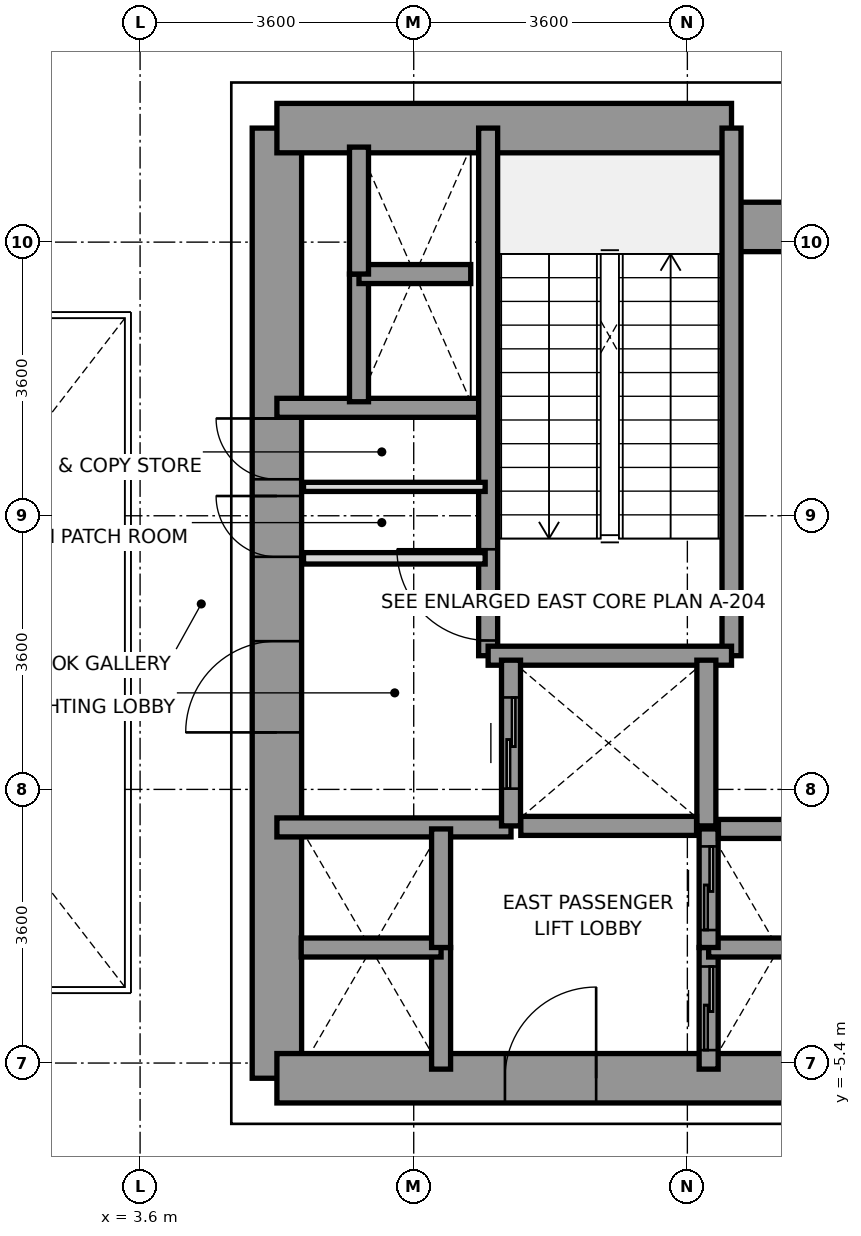
"""IFC4 building model, lengths in metres.
Left out: names, types, materials, properties, quantities, classifications, styles, units other than length and angle.
Written with IfcOpenShell. Run it as: python <this file> out.ifc"""

import sys

from ifc_helpers import new_model, si_unit, direction, frame, frame_2d, origin, place, context, subcontext, project, spatial, rectangle, extrude, source, transform, mapped, element, fill, save


model = new_model("IFC4")
c1 = context("Model", 3, precision=1e-05, world=origin(), true_north=direction((0.0, 1.0)))
c2 = subcontext(c1, "Body", "Model", "MODEL_VIEW")
j1 = project(units=[si_unit("LENGTHUNIT", "METRE"), si_unit("PLANEANGLEUNIT", "RADIAN")], contexts=[c1])
p1 = place(None, origin())
s1 = spatial("IfcSite", under=j1, at=p1, CompositionType="ELEMENT")
p2 = place(p1, origin())
s2 = spatial("IfcBuilding", under=s1, at=p2, CompositionType="ELEMENT")
p3 = place(p2, frame((0.0, 0.0, 20.4)))
s3 = spatial("IfcBuildingStorey", under=s2, at=p3, CompositionType="ELEMENT", Elevation=20.4)
p4 = place(p3, frame((5.4, -5.6, 0.0), z_axis=(0.0, 0.0, 1.0), x_axis=(0.0, 1.0, 0.0)))
e1 = element("IfcWall", 1, at=p4, inside=s3, PredefinedType="SHEAR", context=c2, shape_type="SweptSolid", body=[
    extrude(rectangle(XDim=12.5, YDim=0.65, at=frame_2d((6.25, 0.0))), origin(), (0.0, 0.0, 1.0), 4.48),
])
p5 = place(p4, frame((4.55, 0.0, 0.0)))
e2 = element("IfcOpeningElement", 2, at=p5, cuts=e1, PredefinedType="OPENING", context=c2, shape_type="SweptSolid", body=[
    extrude(rectangle(XDim=1.2, YDim=2.2, at=frame_2d((0.6, 1.1))), frame((0.0, 0.335, 0.0), z_axis=(0.0, -1.0, 0.0), x_axis=(1.0, 0.0, 0.0)), (0.0, 0.0, 1.0), 0.67),
])
p6 = place(p4, frame((6.86, 0.0, 0.0)))
e3 = element("IfcOpeningElement", 3, at=p6, cuts=e1, PredefinedType="OPENING", context=c2, shape_type="SweptSolid", body=[
    extrude(rectangle(XDim=0.8, YDim=2.1, at=frame_2d((0.4, 1.05))), frame((0.0, 0.335, 0.0), z_axis=(0.0, -1.0, 0.0), x_axis=(1.0, 0.0, 0.0)), (0.0, 0.0, 1.0), 0.67),
])
p7 = place(p4, frame((7.88, 0.0, 0.0)))
e4 = element("IfcOpeningElement", 4, at=p7, cuts=e1, PredefinedType="OPENING", context=c2, shape_type="SweptSolid", body=[
    extrude(rectangle(XDim=0.8, YDim=2.1, at=frame_2d((0.4, 1.05))), frame((0.0, 0.335, 0.0), z_axis=(0.0, -1.0, 0.0), x_axis=(1.0, 0.0, 0.0)), (0.0, 0.0, 1.0), 0.67),
])
p8 = place(p3, frame((5.4, 6.9, 0.0), z_axis=(0.0, 0.0, 1.0), x_axis=(1.0, 0.0, 0.0)))
e5 = element("IfcWall", 5, at=p8, inside=s3, PredefinedType="SHEAR", context=c2, shape_type="SweptSolid", body=[
    extrude(rectangle(XDim=5.981, YDim=0.65, at=frame_2d((2.991, 0.0))), origin(), (0.0, 0.0, 1.0), 4.48),
])
p9 = place(p3, frame((11.381, 5.6, 0.0), z_axis=(0.0, 0.0, 1.0), x_axis=(1.0, 0.0, 0.0)))
e6 = element("IfcWall", 6, at=p9, inside=s3, PredefinedType="SHEAR", context=c2, shape_type="SweptSolid", body=[
    extrude(rectangle(XDim=1.819, YDim=0.65, at=frame_2d((0.909, 0.0))), origin(), (0.0, 0.0, 1.0), 4.48),
])
p10 = place(p3, frame((5.4, -5.6, 0.0), z_axis=(0.0, 0.0, 1.0), x_axis=(1.0, 0.0, 0.0)))
e7 = element("IfcWall", 7, at=p10, inside=s3, PredefinedType="SHEAR", context=c2, shape_type="SweptSolid", body=[
    extrude(rectangle(XDim=7.8, YDim=0.65, at=frame_2d((3.9, 0.0))), origin(), (0.0, 0.0, 1.0), 4.48),
])
p11 = place(p10, frame((3.0, 0.0, 0.0)))
e8 = element("IfcOpeningElement", 8, at=p11, cuts=e7, PredefinedType="OPENING", context=c2, shape_type="SweptSolid", body=[
    extrude(rectangle(XDim=1.2, YDim=2.2, at=frame_2d((0.6, 1.1))), frame((0.0, 0.335, 0.0), z_axis=(0.0, -1.0, 0.0), x_axis=(1.0, 0.0, 0.0)), (0.0, 0.0, 1.0), 0.67),
])
p12 = place(p3, frame((5.4, 3.22, 0.0), z_axis=(0.0, 0.0, 1.0), x_axis=(1.0, 0.0, 0.0)))
e9 = element("IfcWall", 9, at=p12, inside=s3, PredefinedType="SOLIDWALL", context=c2, shape_type="SweptSolid", body=[
    extrude(rectangle(XDim=2.78, YDim=0.25, at=frame_2d((1.39, 0.0))), origin(), (0.0, 0.0, 1.0), 4.48),
])
p13 = place(p3, frame((5.4, -2.3, 0.0), z_axis=(0.0, 0.0, 1.0), x_axis=(1.0, 0.0, 0.0)))
e10 = element("IfcWall", 10, at=p13, inside=s3, PredefinedType="SOLIDWALL", context=c2, shape_type="SweptSolid", body=[
    extrude(rectangle(XDim=3.08, YDim=0.25, at=frame_2d((1.54, 0.0))), origin(), (0.0, 0.0, 1.0), 4.48),
])
p14 = place(p3, frame((8.179, -0.041, 0.0), z_axis=(0.0, 0.0, 1.0), x_axis=(0.0, 1.0, 0.0)))
e11 = element("IfcWall", 11, at=p14, inside=s3, PredefinedType="SOLIDWALL", context=c2, shape_type="SweptSolid", body=[
    extrude(rectangle(XDim=6.941, YDim=0.25, at=frame_2d((3.47, 0.0))), origin(), (0.0, 0.0, 1.0), 4.48),
])
p15 = place(p14, frame((0.2, 0.0, 0.0)))
e12 = element("IfcOpeningElement", 12, at=p15, cuts=e11, PredefinedType="OPENING", context=c2, shape_type="SweptSolid", body=[
    extrude(rectangle(XDim=1.2, YDim=2.2, at=frame_2d((0.6, 1.1))), frame((0.0, 0.135, 0.0), z_axis=(0.0, -1.0, 0.0), x_axis=(1.0, 0.0, 0.0)), (0.0, 0.0, 1.0), 0.27),
])
p16 = place(p3, frame((11.381, -0.041, 0.0), z_axis=(0.0, 0.0, 1.0), x_axis=(0.0, 1.0, 0.0)))
e13 = element("IfcWall", 13, at=p16, inside=s3, PredefinedType="SOLIDWALL", context=c2, shape_type="SweptSolid", body=[
    extrude(rectangle(XDim=6.941, YDim=0.25, at=frame_2d((3.47, 0.0))), origin(), (0.0, 0.0, 1.0), 4.48),
])
p17 = place(p3, frame((8.179, -0.041, 0.0), z_axis=(0.0, 0.0, 1.0), x_axis=(1.0, 0.0, 0.0)))
e14 = element("IfcWall", 14, at=p17, inside=s3, PredefinedType="SOLIDWALL", context=c2, shape_type="SweptSolid", body=[
    extrude(rectangle(XDim=3.202, YDim=0.25, at=frame_2d((1.601, 0.0))), origin(), (0.0, 0.0, 1.0), 4.48),
])
p18 = place(p3, frame((8.48, -2.28, 0.0), z_axis=(0.0, 0.0, 1.0), x_axis=(0.0, 1.0, 0.0)))
e15 = element("IfcWall", 15, at=p18, inside=s3, PredefinedType="SOLIDWALL", context=c2, shape_type="SweptSolid", body=[
    extrude(rectangle(XDim=2.18, YDim=0.25, at=frame_2d((1.09, 0.0))), origin(), (0.0, 0.0, 1.0), 4.48),
])
p19 = place(p18, frame((0.49, 0.0, 0.0)))
e16 = element("IfcOpeningElement", 16, at=p19, cuts=e15, PredefinedType="OPENING", context=c2, shape_type="SweptSolid", body=[
    extrude(rectangle(XDim=1.2, YDim=2.2, at=frame_2d((0.6, 1.1))), frame((0.0, 0.135, 0.0), z_axis=(0.0, -1.0, 0.0), x_axis=(1.0, 0.0, 0.0)), (0.0, 0.0, 1.0), 0.27),
])
p20 = place(p3, frame((11.05, -2.28, 0.0), z_axis=(0.0, 0.0, 1.0), x_axis=(0.0, 1.0, 0.0)))
e17 = element("IfcWall", 17, at=p20, inside=s3, PredefinedType="SOLIDWALL", context=c2, shape_type="SweptSolid", body=[
    extrude(rectangle(XDim=2.18, YDim=0.25, at=frame_2d((1.09, 0.0))), origin(), (0.0, 0.0, 1.0), 4.48),
])
p21 = place(p3, frame((8.609, -2.28, 0.0), z_axis=(0.0, 0.0, 1.0), x_axis=(1.0, 0.0, 0.0)))
e18 = element("IfcWall", 18, at=p21, inside=s3, PredefinedType="SOLIDWALL", context=c2, shape_type="SweptSolid", body=[
    extrude(rectangle(XDim=2.312, YDim=0.25, at=frame_2d((1.156, 0.0))), origin(), (0.0, 0.0, 1.0), 4.48),
])
p22 = place(p3, frame((11.08, -5.48, 0.0), z_axis=(0.0, 0.0, 1.0), x_axis=(0.0, 1.0, 0.0)))
e19 = element("IfcWall", 19, at=p22, inside=s3, PredefinedType="SOLIDWALL", context=c2, shape_type="SweptSolid", body=[
    extrude(rectangle(XDim=1.6, YDim=0.25, at=frame_2d((0.8, 0.0))), origin(), (0.0, 0.0, 1.0), 4.48),
])
p23 = place(p22, frame((0.25, 0.0, 0.0)))
e20 = element("IfcOpeningElement", 20, at=p23, cuts=e19, PredefinedType="OPENING", context=c2, shape_type="SweptSolid", body=[
    extrude(rectangle(XDim=1.1, YDim=2.2, at=frame_2d((0.55, 1.1))), frame((0.0, 0.135, 0.0), z_axis=(0.0, -1.0, 0.0), x_axis=(1.0, 0.0, 0.0)), (0.0, 0.0, 1.0), 0.27),
])
p24 = place(p3, frame((11.08, -3.88, 0.0), z_axis=(0.0, 0.0, 1.0), x_axis=(1.0, 0.0, 0.0)))
e21 = element("IfcWall", 21, at=p24, inside=s3, PredefinedType="SOLIDWALL", context=c2, shape_type="SweptSolid", body=[
    extrude(rectangle(XDim=1.84, YDim=0.25, at=frame_2d((0.92, 0.0))), origin(), (0.0, 0.0, 1.0), 4.48),
])
p25 = place(p3, frame((11.08, -3.88, 0.0), z_axis=(0.0, 0.0, 1.0), x_axis=(0.0, 1.0, 0.0)))
e22 = element("IfcWall", 22, at=p25, inside=s3, PredefinedType="SOLIDWALL", context=c2, shape_type="SweptSolid", body=[
    extrude(rectangle(XDim=1.56, YDim=0.25, at=frame_2d((0.78, 0.0))), origin(), (0.0, 0.0, 1.0), 4.48),
])
p26 = place(p25, frame((0.23, 0.0, 0.0)))
e23 = element("IfcOpeningElement", 23, at=p26, cuts=e22, PredefinedType="OPENING", context=c2, shape_type="SweptSolid", body=[
    extrude(rectangle(XDim=1.1, YDim=2.2, at=frame_2d((0.55, 1.1))), frame((0.0, 0.135, 0.0), z_axis=(0.0, -1.0, 0.0), x_axis=(1.0, 0.0, 0.0)), (0.0, 0.0, 1.0), 0.27),
])
p27 = place(p3, frame((11.209, -2.32, 0.0), z_axis=(0.0, 0.0, 1.0), x_axis=(1.0, 0.0, 0.0)))
e24 = element("IfcWall", 24, at=p27, inside=s3, PredefinedType="SOLIDWALL", context=c2, shape_type="SweptSolid", body=[
    extrude(rectangle(XDim=1.582, YDim=0.25, at=frame_2d((0.791, 0.0))), origin(), (0.0, 0.0, 1.0), 4.48),
])
p28 = place(p3, frame((7.56, -5.48, 0.0), z_axis=(0.0, 0.0, 1.0), x_axis=(0.0, 1.0, 0.0)))
e25 = element("IfcWall", 25, at=p28, inside=s3, PredefinedType="SOLIDWALL", context=c2, shape_type="SweptSolid", body=[
    extrude(rectangle(XDim=1.6, YDim=0.25, at=frame_2d((0.8, 0.0))), origin(), (0.0, 0.0, 1.0), 4.48),
])
p29 = place(p3, frame((5.72, -3.88, 0.0), z_axis=(0.0, 0.0, 1.0), x_axis=(1.0, 0.0, 0.0)))
e26 = element("IfcWall", 26, at=p29, inside=s3, PredefinedType="SOLIDWALL", context=c2, shape_type="SweptSolid", body=[
    extrude(rectangle(XDim=1.84, YDim=0.25, at=frame_2d((0.92, 0.0))), origin(), (0.0, 0.0, 1.0), 4.48),
])
p30 = place(p3, frame((7.56, -3.88, 0.0), z_axis=(0.0, 0.0, 1.0), x_axis=(0.0, 1.0, 0.0)))
e27 = element("IfcWall", 27, at=p30, inside=s3, PredefinedType="SOLIDWALL", context=c2, shape_type="SweptSolid", body=[
    extrude(rectangle(XDim=1.56, YDim=0.25, at=frame_2d((0.78, 0.0))), origin(), (0.0, 0.0, 1.0), 4.48),
])
p31 = place(p3, frame((6.48, 3.3, 0.0), z_axis=(0.0, 0.0, 1.0), x_axis=(0.0, 1.0, 0.0)))
e28 = element("IfcWall", 28, at=p31, inside=s3, PredefinedType="SOLIDWALL", context=c2, shape_type="SweptSolid", body=[
    extrude(rectangle(XDim=1.68, YDim=0.25, at=frame_2d((0.84, 0.0))), origin(), (0.0, 0.0, 1.0), 4.48),
])
p32 = place(p3, frame((6.48, 4.98, 0.0), z_axis=(0.0, 0.0, 1.0), x_axis=(1.0, 0.0, 0.0)))
e29 = element("IfcWall", 29, at=p32, inside=s3, PredefinedType="SOLIDWALL", context=c2, shape_type="SweptSolid", body=[
    extrude(rectangle(XDim=1.47, YDim=0.25, at=frame_2d((0.735, 0.0))), origin(), (0.0, 0.0, 1.0), 4.48),
])
p33 = place(p3, frame((6.48, 4.98, 0.0), z_axis=(0.0, 0.0, 1.0), x_axis=(0.0, 1.0, 0.0)))
e30 = element("IfcWall", 30, at=p33, inside=s3, PredefinedType="SOLIDWALL", context=c2, shape_type="SweptSolid", body=[
    extrude(rectangle(XDim=1.67, YDim=0.25, at=frame_2d((0.835, 0.0))), origin(), (0.0, 0.0, 1.0), 4.48),
])
p34 = place(p3, frame((5.75, 1.24, 0.0), z_axis=(0.0, 0.0, 1.0), x_axis=(1.0, 0.0, 0.0)))
e31 = element("IfcWall", 31, at=p34, inside=s3, PredefinedType="PARTITIONING", context=c2, shape_type="SweptSolid", body=[
    extrude(rectangle(XDim=2.39, YDim=0.15, at=frame_2d((1.195, 0.0))), origin(), (0.0, 0.0, 1.0), 3.58),
])
p35 = place(p3, frame((5.75, 2.18, 0.0), z_axis=(0.0, 0.0, 1.0), x_axis=(1.0, 0.0, 0.0)))
e32 = element("IfcWall", 32, at=p35, inside=s3, PredefinedType="PARTITIONING", context=c2, shape_type="SweptSolid", body=[
    extrude(rectangle(XDim=2.39, YDim=0.12, at=frame_2d((1.195, 0.0))), origin(), (0.0, 0.0, 1.0), 3.58),
])
m1 = source(origin(), c2, "Body", "SweptSolid", [
    extrude(rectangle(XDim=1.2, YDim=2.2, at=frame_2d((0.6, 1.1))), frame((0.0, 0.025, 0.0), z_axis=(0.0, -1.0, 0.0), x_axis=(1.0, 0.0, 0.0)), (0.0, 0.0, 1.0), 0.05),
])
p36 = place(p15, origin())
e33 = element("IfcDoor", 33, at=p36, inside=s3, OperationType="SINGLE_SWING_RIGHT", PredefinedType="DOOR", context=c2, shape_type="MappedRepresentation", body=[
    mapped(m1, transform((0.0, 0.0, 0.0), x_axis=(1.0, 0.0, 0.0), y_axis=(0.0, 1.0, 0.0), z_axis=(0.0, 0.0, 1.0), scale=1.0)),
])
fill(e12, e33)
p37 = place(p5, origin())
e34 = element("IfcDoor", 34, at=p37, inside=s3, OperationType="SINGLE_SWING_LEFT", PredefinedType="DOOR", context=c2, shape_type="MappedRepresentation", body=[
    mapped(m1, transform((0.0, 0.0, 0.0), x_axis=(1.0, 0.0, 0.0), y_axis=(0.0, 1.0, 0.0), z_axis=(0.0, 0.0, 1.0), scale=1.0)),
])
fill(e2, e34)
p38 = place(p11, origin())
e35 = element("IfcDoor", 35, at=p38, inside=s3, OperationType="SINGLE_SWING_RIGHT", PredefinedType="DOOR", context=c2, shape_type="MappedRepresentation", body=[
    mapped(m1, transform((0.0, 0.0, 0.0), x_axis=(1.0, 0.0, 0.0), y_axis=(0.0, 1.0, 0.0), z_axis=(0.0, 0.0, 1.0), scale=1.0)),
])
fill(e8, e35)
m2 = source(origin(), c2, "Body", "SweptSolid", [
    extrude(rectangle(XDim=0.8, YDim=2.1, at=frame_2d((0.4, 1.05))), frame((0.0, 0.025, 0.0), z_axis=(0.0, -1.0, 0.0), x_axis=(1.0, 0.0, 0.0)), (0.0, 0.0, 1.0), 0.05),
])
p39 = place(p6, origin())
e36 = element("IfcDoor", 36, at=p39, inside=s3, OperationType="SINGLE_SWING_RIGHT", PredefinedType="DOOR", context=c2, shape_type="MappedRepresentation", body=[
    mapped(m2, transform((0.0, 0.0, 0.0), x_axis=(1.0, 0.0, 0.0), y_axis=(0.0, 1.0, 0.0), z_axis=(0.0, 0.0, 1.0), scale=1.0)),
])
fill(e3, e36)
p40 = place(p7, origin())
e37 = element("IfcDoor", 37, at=p40, inside=s3, OperationType="SINGLE_SWING_RIGHT", PredefinedType="DOOR", context=c2, shape_type="MappedRepresentation", body=[
    mapped(m2, transform((0.0, 0.0, 0.0), x_axis=(1.0, 0.0, 0.0), y_axis=(0.0, 1.0, 0.0), z_axis=(0.0, 0.0, 1.0), scale=1.0)),
])
fill(e4, e37)
p41 = place(p19, origin())
e38 = element("IfcDoor", 38, at=p41, inside=s3, OperationType="SLIDING_TO_RIGHT", PredefinedType="DOOR", context=c2, shape_type="MappedRepresentation", body=[
    mapped(m1, transform((0.0, 0.0, 0.0), x_axis=(1.0, 0.0, 0.0), y_axis=(0.0, 1.0, 0.0), z_axis=(0.0, 0.0, 1.0), scale=1.0)),
])
fill(e16, e38)
m3 = source(origin(), c2, "Body", "SweptSolid", [
    extrude(rectangle(XDim=1.1, YDim=2.2, at=frame_2d((0.55, 1.1))), frame((0.0, 0.025, 0.0), z_axis=(0.0, -1.0, 0.0), x_axis=(1.0, 0.0, 0.0)), (0.0, 0.0, 1.0), 0.05),
])
p42 = place(p23, origin())
e39 = element("IfcDoor", 39, at=p42, inside=s3, OperationType="SLIDING_TO_LEFT", PredefinedType="DOOR", context=c2, shape_type="MappedRepresentation", body=[
    mapped(m3, transform((0.0, 0.0, 0.0), x_axis=(1.0, 0.0, 0.0), y_axis=(0.0, 1.0, 0.0), z_axis=(0.0, 0.0, 1.0), scale=1.0)),
])
fill(e20, e39)
p43 = place(p26, origin())
e40 = element("IfcDoor", 40, at=p43, inside=s3, OperationType="SLIDING_TO_LEFT", PredefinedType="DOOR", context=c2, shape_type="MappedRepresentation", body=[
    mapped(m3, transform((0.0, 0.0, 0.0), x_axis=(1.0, 0.0, 0.0), y_axis=(0.0, 1.0, 0.0), z_axis=(0.0, 0.0, 1.0), scale=1.0)),
])
fill(e23, e40)
save(model, sys.argv[1])
